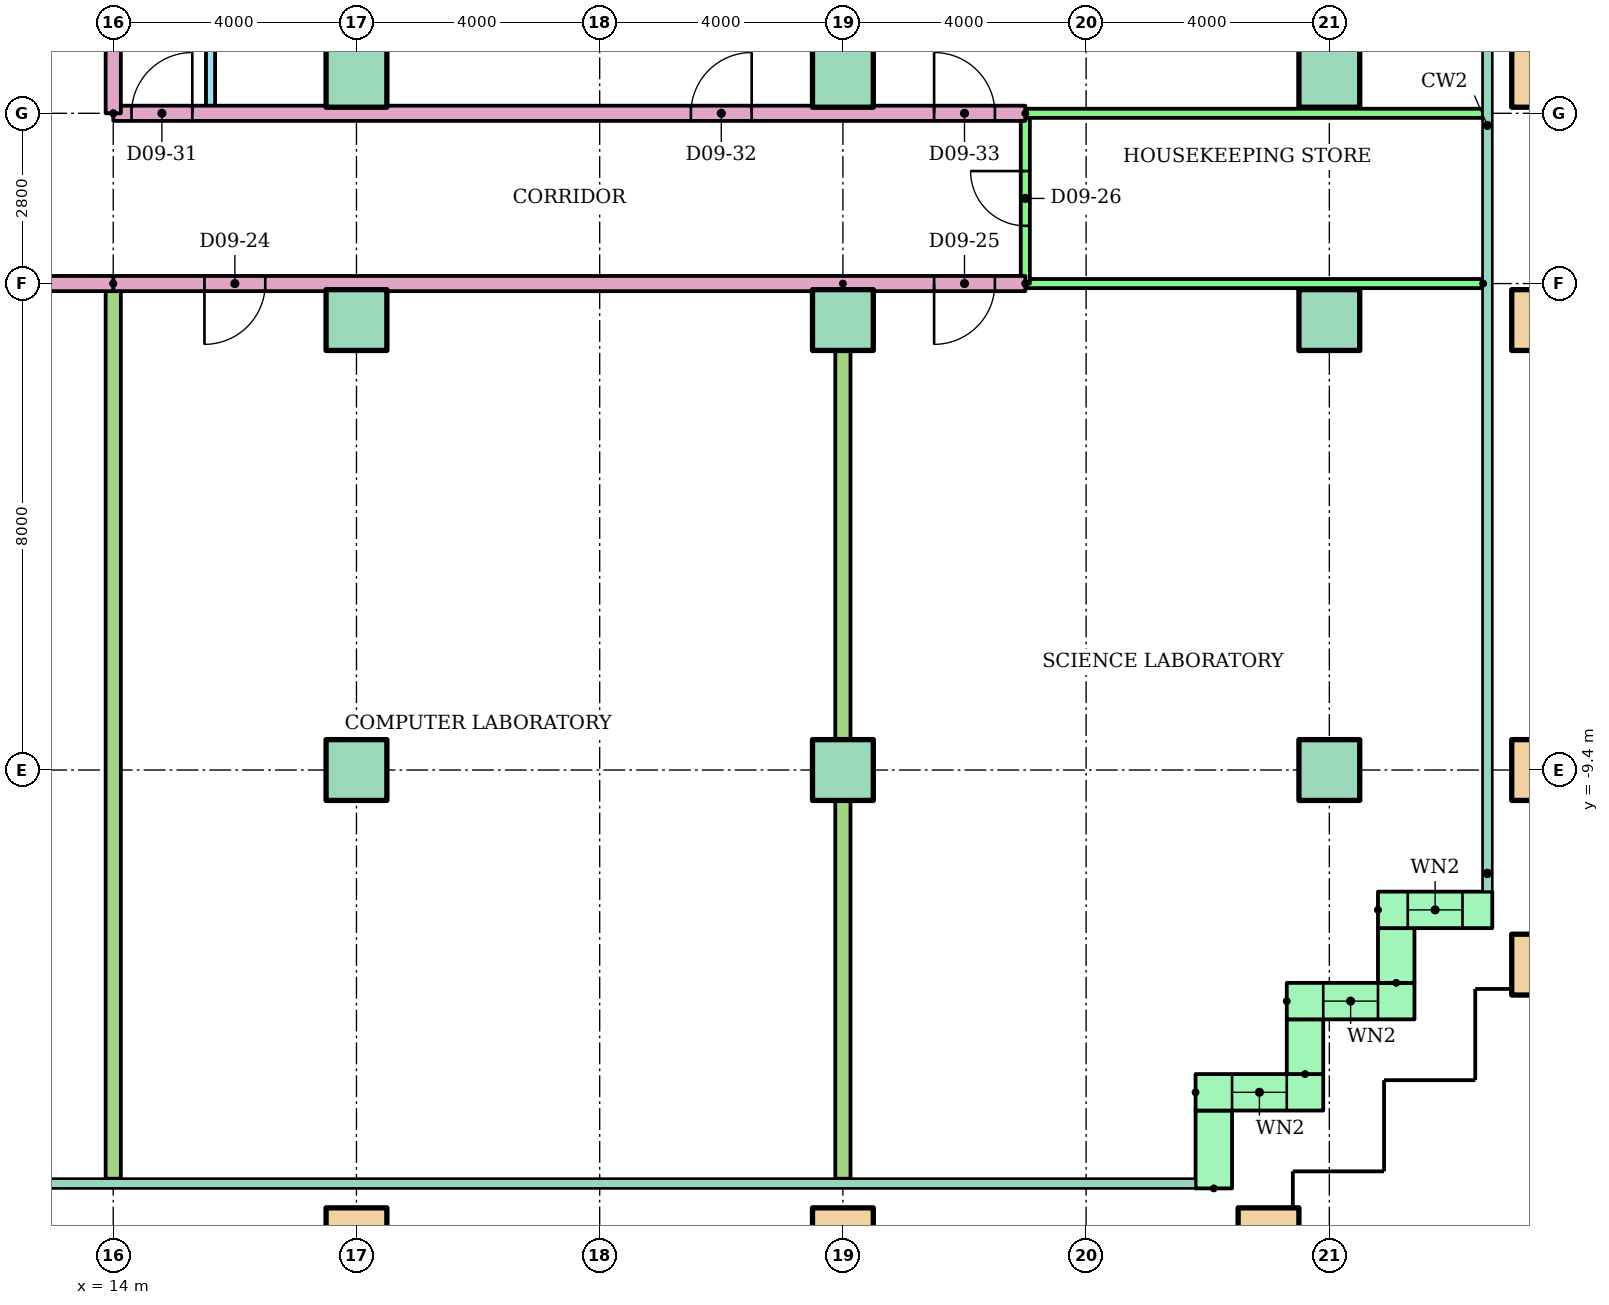
"""IFC4 building model, lengths in metres.
Left out: names, types, materials, properties, quantities, classifications, styles, units other than length and angle.
Written with IfcOpenShell. Run it as: python <this file> out.ifc"""

import sys

from ifc_helpers import new_model, si_unit, direction, frame, frame_2d, origin, origin_2d, place, context, subcontext, project, spatial, rectangle, hollow_rectangle, extrude, element, fill, save


model = new_model("IFC4")
c1 = context("Model", 3, precision=1e-05, world=origin(), true_north=direction((0.0, 1.0)))
c2 = subcontext(c1, "Body", "Model", "MODEL_VIEW")
j1 = project(units=[si_unit("LENGTHUNIT", "METRE"), si_unit("PLANEANGLEUNIT", "RADIAN")], contexts=[c1])
p1 = place(None, origin())
s1 = spatial("IfcSite", under=j1, at=p1, CompositionType="ELEMENT")
p2 = place(p1, origin())
s2 = spatial("IfcBuilding", under=s1, at=p2, CompositionType="ELEMENT")
p3 = place(p2, frame((0.0, 0.0, 37.7)))
s3 = spatial("IfcBuildingStorey", under=s2, at=p3, CompositionType="ELEMENT", Elevation=37.7)
for number, where in (
    (1, (18.0, -17.1, 0.0)),
    (2, (26.0, -17.1, 0.0)),
    (3, (33.0, -17.1, 0.0)),
    (4, (37.5, -12.6, 0.0)),
):
    element("IfcColumn", number, at=place(p3, frame(where)), inside=s3, PredefinedType="COLUMN", context=c2, shape_type="SweptSolid", body=[
        extrude(hollow_rectangle(XDim=1.0, YDim=1.0, WallThickness=0.05, at=origin_2d()), origin(), (0.0, 0.0, 1.0), 3.9),
    ])
for number, where in (
    (5, (18.0, -9.4, 0.0)),
    (6, (26.0, -9.4, 0.0)),
    (7, (34.0, -9.4, 0.0)),
):
    element("IfcColumn", number, at=place(p3, frame(where)), inside=s3, PredefinedType="COLUMN", context=c2, shape_type="SweptSolid", body=[
        extrude(rectangle(XDim=1.0, YDim=1.0, at=origin_2d()), origin(), (0.0, 0.0, 1.0), 3.9),
    ])
p4 = place(p3, frame((37.5, -9.4, 0.0)))
e8 = element("IfcColumn", 8, at=p4, inside=s3, PredefinedType="COLUMN", context=c2, shape_type="SweptSolid", body=[
    extrude(hollow_rectangle(XDim=1.0, YDim=1.0, WallThickness=0.05, at=origin_2d()), origin(), (0.0, 0.0, 1.0), 3.9),
])
for number, where in (
    (9, (18.0, -2.0, 0.0)),
    (10, (26.0, -2.0, 0.0)),
    (11, (34.0, -2.0, 0.0)),
):
    element("IfcColumn", number, at=place(p3, frame(where)), inside=s3, PredefinedType="COLUMN", context=c2, shape_type="SweptSolid", body=[
        extrude(rectangle(XDim=1.0, YDim=1.0, at=origin_2d()), origin(), (0.0, 0.0, 1.0), 3.9),
    ])
p5 = place(p3, frame((37.5, -2.0, 0.0)))
e12 = element("IfcColumn", 12, at=p5, inside=s3, PredefinedType="COLUMN", context=c2, shape_type="SweptSolid", body=[
    extrude(hollow_rectangle(XDim=1.0, YDim=1.0, WallThickness=0.05, at=origin_2d()), origin(), (0.0, 0.0, 1.0), 3.9),
])
for number, where in (
    (13, (18.0, 2.0, 0.0)),
    (14, (26.0, 2.0, 0.0)),
    (15, (34.0, 2.0, 0.0)),
):
    element("IfcColumn", number, at=place(p3, frame(where)), inside=s3, PredefinedType="COLUMN", context=c2, shape_type="SweptSolid", body=[
        extrude(rectangle(XDim=1.0, YDim=1.0, at=origin_2d()), origin(), (0.0, 0.0, 1.0), 3.9),
    ])
p6 = place(p3, frame((37.5, 2.0, 0.0)))
e16 = element("IfcColumn", 16, at=p6, inside=s3, PredefinedType="COLUMN", context=c2, shape_type="SweptSolid", body=[
    extrude(hollow_rectangle(XDim=1.0, YDim=1.0, WallThickness=0.05, at=origin_2d()), origin(), (0.0, 0.0, 1.0), 3.9),
])
p7 = place(p3, frame((32.1, -16.28, 0.0), z_axis=(0.0, 0.0, 1.0), x_axis=(0.0, 1.0, 0.0)))
e17 = element("IfcWall", 17, at=p7, inside=s3, PredefinedType="STANDARD", context=c2, shape_type="SweptSolid", body=[
    extrude(rectangle(XDim=1.28, YDim=0.6, at=frame_2d((0.64, 0.0))), origin(), (0.0, 0.0, 1.0), 3.62),
])
p8 = place(p3, frame((31.8, -14.7, 0.0)))
e18 = element("IfcWall", 18, at=p8, inside=s3, PredefinedType="STANDARD", context=c2, shape_type="SweptSolid", body=[
    extrude(rectangle(XDim=2.1, YDim=0.6, at=frame_2d((1.05, 0.0))), origin(), (0.0, 0.0, 1.0), 3.62),
])
p9 = place(p8, frame((0.6, 0.0, 0.9)))
e19 = element("IfcOpeningElement", 19, at=p9, cuts=e18, PredefinedType="OPENING", context=c2, shape_type="SweptSolid", body=[
    extrude(rectangle(XDim=0.9, YDim=1.8, at=frame_2d((0.45, 0.9))), frame((0.0, 0.31, 0.0), z_axis=(0.0, -1.0, 0.0), x_axis=(1.0, 0.0, 0.0)), (0.0, 0.0, 1.0), 0.62),
])
p10 = place(p3, frame((33.6, -14.4, 0.0), z_axis=(0.0, 0.0, 1.0), x_axis=(0.0, 1.0, 0.0)))
e20 = element("IfcWall", 20, at=p10, inside=s3, PredefinedType="STANDARD", context=c2, shape_type="SweptSolid", body=[
    extrude(rectangle(XDim=0.9, YDim=0.6, at=frame_2d((0.45, 0.0))), origin(), (0.0, 0.0, 1.0), 3.62),
])
p11 = place(p3, frame((33.3, -13.2, 0.0)))
e21 = element("IfcWall", 21, at=p11, inside=s3, PredefinedType="STANDARD", context=c2, shape_type="SweptSolid", body=[
    extrude(rectangle(XDim=2.1, YDim=0.6, at=frame_2d((1.05, 0.0))), origin(), (0.0, 0.0, 1.0), 3.62),
])
p12 = place(p11, frame((0.6, 0.0, 0.9)))
e22 = element("IfcOpeningElement", 22, at=p12, cuts=e21, PredefinedType="OPENING", context=c2, shape_type="SweptSolid", body=[
    extrude(rectangle(XDim=0.9, YDim=1.8, at=frame_2d((0.45, 0.9))), frame((0.0, 0.31, 0.0), z_axis=(0.0, -1.0, 0.0), x_axis=(1.0, 0.0, 0.0)), (0.0, 0.0, 1.0), 0.62),
])
p13 = place(p3, frame((35.1, -12.9, 0.0), z_axis=(0.0, 0.0, 1.0), x_axis=(0.0, 1.0, 0.0)))
e23 = element("IfcWall", 23, at=p13, inside=s3, PredefinedType="STANDARD", context=c2, shape_type="SweptSolid", body=[
    extrude(rectangle(XDim=0.9, YDim=0.6, at=frame_2d((0.45, 0.0))), origin(), (0.0, 0.0, 1.0), 3.62),
])
p14 = place(p3, frame((34.8, -11.7, 0.0)))
e24 = element("IfcWall", 24, at=p14, inside=s3, PredefinedType="STANDARD", context=c2, shape_type="SweptSolid", body=[
    extrude(rectangle(XDim=1.88, YDim=0.6, at=frame_2d((0.94, 0.0))), origin(), (0.0, 0.0, 1.0), 3.62),
])
p15 = place(p14, frame((0.49, 0.0, 0.9)))
e25 = element("IfcOpeningElement", 25, at=p15, cuts=e24, PredefinedType="OPENING", context=c2, shape_type="SweptSolid", body=[
    extrude(rectangle(XDim=0.9, YDim=1.8, at=frame_2d((0.45, 0.9))), frame((0.0, 0.31, 0.0), z_axis=(0.0, -1.0, 0.0), x_axis=(1.0, 0.0, 0.0)), (0.0, 0.0, 1.0), 0.62),
])
p16 = place(p3, frame((29.0, -1.4, 0.0), z_axis=(0.0, 0.0, 1.0), x_axis=(-1.0, 0.0, 0.0)))
e26 = element("IfcWall", 26, at=p16, inside=s3, PredefinedType="PARTITIONING", context=c2, shape_type="SweptSolid", body=[
    extrude(rectangle(XDim=15.0, YDim=0.25, at=frame_2d((7.5, 0.0))), origin(), (0.0, 0.0, 1.0), 3.1),
])
p17 = place(p16, frame((12.5, 0.0, 0.0)))
e27 = element("IfcOpeningElement", 27, at=p17, cuts=e26, PredefinedType="OPENING", context=c2, shape_type="SweptSolid", body=[
    extrude(rectangle(XDim=1.0, YDim=2.1, at=frame_2d((0.5, 1.05))), frame((0.0, 0.135, 0.0), z_axis=(0.0, -1.0, 0.0), x_axis=(1.0, 0.0, 0.0)), (0.0, 0.0, 1.0), 0.27),
])
p18 = place(p16, frame((0.5, 0.0, 0.0)))
e28 = element("IfcOpeningElement", 28, at=p18, cuts=e26, PredefinedType="OPENING", context=c2, shape_type="SweptSolid", body=[
    extrude(rectangle(XDim=1.0, YDim=2.1, at=frame_2d((0.5, 1.05))), frame((0.0, 0.135, 0.0), z_axis=(0.0, -1.0, 0.0), x_axis=(1.0, 0.0, 0.0)), (0.0, 0.0, 1.0), 0.27),
])
p19 = place(p3, frame((36.53, -1.4, 0.0), z_axis=(0.0, 0.0, 1.0), x_axis=(-1.0, 0.0, 0.0)))
e29 = element("IfcWall", 29, at=p19, inside=s3, PredefinedType="PARTITIONING", context=c2, shape_type="SweptSolid", body=[
    extrude(rectangle(XDim=7.53, YDim=0.15, at=frame_2d((3.765, 0.0))), origin(), (0.0, 0.0, 1.0), 3.1),
])
p20 = place(p3, frame((29.0, -1.4, 0.0), z_axis=(0.0, 0.0, 1.0), x_axis=(0.0, 1.0, 0.0)))
e30 = element("IfcWall", 30, at=p20, inside=s3, PredefinedType="PARTITIONING", context=c2, shape_type="SweptSolid", body=[
    extrude(rectangle(XDim=2.8, YDim=0.15, at=frame_2d((1.4, 0.0))), origin(), (0.0, 0.0, 1.0), 3.1),
])
p21 = place(p20, frame((0.95, 0.0, 0.0)))
e31 = element("IfcOpeningElement", 31, at=p21, cuts=e30, PredefinedType="OPENING", context=c2, shape_type="SweptSolid", body=[
    extrude(rectangle(XDim=0.9, YDim=2.1, at=frame_2d((0.45, 1.05))), frame((0.0, 0.085, 0.0), z_axis=(0.0, -1.0, 0.0), x_axis=(1.0, 0.0, 0.0)), (0.0, 0.0, 1.0), 0.17),
])
for number, where, z_axis, x_axis in (
    (32, (14.0, -1.4, 0.0), (0.0, 0.0, 1.0), (0.0, -1.0, 0.0)),
    (33, (26.0, -1.4, 0.0), (0.0, 0.0, 1.0), (0.0, -1.0, 0.0)),
):
    element("IfcWall", number, at=place(p3, frame(where, z_axis=z_axis, x_axis=x_axis)), inside=s3, PredefinedType="PARTITIONING", context=c2, shape_type="SweptSolid", body=[
        extrude(rectangle(XDim=14.721, YDim=0.25, at=frame_2d((7.361, 0.0))), origin(), (0.0, 0.0, 1.0), 3.1),
    ])
p22 = place(p3, frame((14.0, 1.4, 0.0)))
e34 = element("IfcWall", 34, at=p22, inside=s3, PredefinedType="PARTITIONING", context=c2, shape_type="SweptSolid", body=[
    extrude(rectangle(XDim=15.0, YDim=0.25, at=frame_2d((7.5, 0.0))), origin(), (0.0, 0.0, 1.0), 3.1),
])
p23 = place(p22, frame((0.3, 0.0, 0.0)))
e35 = element("IfcOpeningElement", 35, at=p23, cuts=e34, PredefinedType="OPENING", context=c2, shape_type="SweptSolid", body=[
    extrude(rectangle(XDim=1.0, YDim=2.1, at=frame_2d((0.5, 1.05))), frame((0.0, 0.135, 0.0), z_axis=(0.0, -1.0, 0.0), x_axis=(1.0, 0.0, 0.0)), (0.0, 0.0, 1.0), 0.27),
])
p24 = place(p22, frame((9.5, 0.0, 0.0)))
e36 = element("IfcOpeningElement", 36, at=p24, cuts=e34, PredefinedType="OPENING", context=c2, shape_type="SweptSolid", body=[
    extrude(rectangle(XDim=1.0, YDim=2.1, at=frame_2d((0.5, 1.05))), frame((0.0, 0.135, 0.0), z_axis=(0.0, -1.0, 0.0), x_axis=(1.0, 0.0, 0.0)), (0.0, 0.0, 1.0), 0.27),
])
p25 = place(p22, frame((13.5, 0.0, 0.0)))
e37 = element("IfcOpeningElement", 37, at=p25, cuts=e34, PredefinedType="OPENING", context=c2, shape_type="SweptSolid", body=[
    extrude(rectangle(XDim=1.0, YDim=2.1, at=frame_2d((0.5, 1.05))), frame((0.0, 0.135, 0.0), z_axis=(0.0, -1.0, 0.0), x_axis=(1.0, 0.0, 0.0)), (0.0, 0.0, 1.0), 0.27),
])
p26 = place(p3, frame((29.0, 1.4, 0.0)))
e38 = element("IfcWall", 38, at=p26, inside=s3, PredefinedType="PARTITIONING", context=c2, shape_type="SweptSolid", body=[
    extrude(rectangle(XDim=7.53, YDim=0.15, at=frame_2d((3.765, 0.0))), origin(), (0.0, 0.0, 1.0), 3.1),
])
p27 = place(p3, frame((15.6, 18.521, 0.0), z_axis=(0.0, 0.0, 1.0), x_axis=(0.0, -1.0, 0.0)))
e39 = element("IfcWall", 39, at=p27, inside=s3, PredefinedType="PARTITIONING", context=c2, shape_type="SweptSolid", body=[
    extrude(rectangle(XDim=17.121, YDim=0.15, at=frame_2d((8.561, 0.0))), origin(), (0.0, 0.0, 1.0), 3.1),
])
p28 = place(p27, frame((15.071, 0.0, 0.0)))
e40 = element("IfcOpeningElement", 40, at=p28, cuts=e39, PredefinedType="OPENING", context=c2, shape_type="SweptSolid", body=[
    extrude(rectangle(XDim=0.9, YDim=2.1, at=frame_2d((0.45, 1.05))), frame((0.0, 0.085, 0.0), z_axis=(0.0, -1.0, 0.0), x_axis=(1.0, 0.0, 0.0)), (0.0, 0.0, 1.0), 0.17),
])
p29 = place(p27, frame((10.071, 0.0, 0.0)))
e41 = element("IfcOpeningElement", 41, at=p29, cuts=e39, PredefinedType="OPENING", context=c2, shape_type="SweptSolid", body=[
    extrude(rectangle(XDim=0.9, YDim=2.1, at=frame_2d((0.45, 1.05))), frame((0.0, 0.085, 0.0), z_axis=(0.0, -1.0, 0.0), x_axis=(1.0, 0.0, 0.0)), (0.0, 0.0, 1.0), 0.17),
])
p30 = place(p27, frame((5.021, 0.0, 0.0)))
e42 = element("IfcOpeningElement", 42, at=p30, cuts=e39, PredefinedType="OPENING", context=c2, shape_type="SweptSolid", body=[
    extrude(rectangle(XDim=1.0, YDim=2.1, at=frame_2d((0.5, 1.05))), frame((0.0, 0.085, 0.0), z_axis=(0.0, -1.0, 0.0), x_axis=(1.0, 0.0, 0.0)), (0.0, 0.0, 1.0), 0.17),
])
p31 = place(p27, frame((1.471, 0.0, 0.0)))
e43 = element("IfcOpeningElement", 43, at=p31, cuts=e39, PredefinedType="OPENING", context=c2, shape_type="SweptSolid", body=[
    extrude(rectangle(XDim=0.9, YDim=2.1, at=frame_2d((0.45, 1.05))), frame((0.0, 0.085, 0.0), z_axis=(0.0, -1.0, 0.0), x_axis=(1.0, 0.0, 0.0)), (0.0, 0.0, 1.0), 0.17),
])
for number, where, z_axis, x_axis in (
    (44, (18.0, 18.521, 0.0), (0.0, 0.0, 1.0), (0.0, -1.0, 0.0)),
    (45, (26.0, 18.521, 0.0), (0.0, 0.0, 1.0), (0.0, -1.0, 0.0)),
):
    element("IfcWall", number, at=place(p3, frame(where, z_axis=z_axis, x_axis=x_axis)), inside=s3, PredefinedType="PARTITIONING", context=c2, shape_type="SweptSolid", body=[
        extrude(rectangle(XDim=17.121, YDim=0.25, at=frame_2d((8.561, 0.0))), origin(), (0.0, 0.0, 1.0), 3.1),
    ])
p32 = place(p3, frame((14.0, -1.4, 0.0), z_axis=(0.0, 0.0, 1.0), x_axis=(-1.0, 0.0, 0.0)))
e46 = element("IfcWall", 46, at=p32, inside=s3, PredefinedType="PARTITIONING", context=c2, shape_type="SweptSolid", body=[
    extrude(rectangle(XDim=28.0, YDim=0.25, at=frame_2d((14.0, 0.0))), origin(), (0.0, 0.0, 1.0), 3.1),
])
p33 = place(p32, frame((21.5, 0.0, 0.0)))
e47 = element("IfcOpeningElement", 47, at=p33, cuts=e46, PredefinedType="OPENING", context=c2, shape_type="SweptSolid", body=[
    extrude(rectangle(XDim=1.0, YDim=2.1, at=frame_2d((0.5, 1.05))), frame((0.0, 0.135, 0.0), z_axis=(0.0, -1.0, 0.0), x_axis=(1.0, 0.0, 0.0)), (0.0, 0.0, 1.0), 0.27),
])
p34 = place(p32, frame((17.5, 0.0, 0.0)))
e48 = element("IfcOpeningElement", 48, at=p34, cuts=e46, PredefinedType="OPENING", context=c2, shape_type="SweptSolid", body=[
    extrude(rectangle(XDim=1.0, YDim=2.1, at=frame_2d((0.5, 1.05))), frame((0.0, 0.135, 0.0), z_axis=(0.0, -1.0, 0.0), x_axis=(1.0, 0.0, 0.0)), (0.0, 0.0, 1.0), 0.27),
])
p35 = place(p32, frame((1.5, 0.0, 0.0)))
e49 = element("IfcOpeningElement", 49, at=p35, cuts=e46, PredefinedType="OPENING", context=c2, shape_type="SweptSolid", body=[
    extrude(rectangle(XDim=1.0, YDim=2.1, at=frame_2d((0.5, 1.05))), frame((0.0, 0.135, 0.0), z_axis=(0.0, -1.0, 0.0), x_axis=(1.0, 0.0, 0.0)), (0.0, 0.0, 1.0), 0.27),
])
p36 = place(p3, frame((14.0, 1.4, 0.0), z_axis=(0.0, 0.0, 1.0), x_axis=(0.0, 1.0, 0.0)))
e50 = element("IfcWall", 50, at=p36, inside=s3, PredefinedType="PARTITIONING", context=c2, shape_type="SweptSolid", body=[
    extrude(rectangle(XDim=1.6, YDim=0.25, at=frame_2d((0.8, 0.0))), origin(), (0.0, 0.0, 1.0), 3.1),
])
p37 = place(p9, origin())
e51 = element("IfcWindow", 51, at=p37, inside=s3, PartitioningType="SINGLE_PANEL", PredefinedType="WINDOW", context=c2, shape_type="SweptSolid", body=[
    extrude(rectangle(XDim=0.9, YDim=1.8, at=frame_2d((0.45, 0.9))), frame((0.0, 0.03, 0.0), z_axis=(0.0, -1.0, 0.0), x_axis=(1.0, 0.0, 0.0)), (0.0, 0.0, 1.0), 0.06),
])
fill(e19, e51)
p38 = place(p12, origin())
e52 = element("IfcWindow", 52, at=p38, inside=s3, PartitioningType="SINGLE_PANEL", PredefinedType="WINDOW", context=c2, shape_type="SweptSolid", body=[
    extrude(rectangle(XDim=0.9, YDim=1.8, at=frame_2d((0.45, 0.9))), frame((0.0, 0.03, 0.0), z_axis=(0.0, -1.0, 0.0), x_axis=(1.0, 0.0, 0.0)), (0.0, 0.0, 1.0), 0.06),
])
fill(e22, e52)
p39 = place(p15, origin())
e53 = element("IfcWindow", 53, at=p39, inside=s3, PartitioningType="SINGLE_PANEL", PredefinedType="WINDOW", context=c2, shape_type="SweptSolid", body=[
    extrude(rectangle(XDim=0.9, YDim=1.8, at=frame_2d((0.45, 0.9))), frame((0.0, 0.03, 0.0), z_axis=(0.0, -1.0, 0.0), x_axis=(1.0, 0.0, 0.0)), (0.0, 0.0, 1.0), 0.06),
])
fill(e25, e53)
p40 = place(p17, origin())
e54 = element("IfcDoor", 54, at=p40, inside=s3, OperationType="SINGLE_SWING_RIGHT", PredefinedType="DOOR", context=c2, shape_type="SweptSolid", body=[
    extrude(rectangle(XDim=1.0, YDim=2.1, at=frame_2d((0.5, 1.05))), frame((0.0, 0.025, 0.0), z_axis=(0.0, -1.0, 0.0), x_axis=(1.0, 0.0, 0.0)), (0.0, 0.0, 1.0), 0.05),
])
fill(e27, e54)
p41 = place(p18, origin())
e55 = element("IfcDoor", 55, at=p41, inside=s3, OperationType="SINGLE_SWING_RIGHT", PredefinedType="DOOR", context=c2, shape_type="SweptSolid", body=[
    extrude(rectangle(XDim=1.0, YDim=2.1, at=frame_2d((0.5, 1.05))), frame((0.0, 0.025, 0.0), z_axis=(0.0, -1.0, 0.0), x_axis=(1.0, 0.0, 0.0)), (0.0, 0.0, 1.0), 0.05),
])
fill(e28, e55)
p42 = place(p21, origin())
e56 = element("IfcDoor", 56, at=p42, inside=s3, OperationType="SINGLE_SWING_RIGHT", PredefinedType="DOOR", context=c2, shape_type="SweptSolid", body=[
    extrude(rectangle(XDim=0.9, YDim=2.1, at=frame_2d((0.45, 1.05))), frame((0.0, 0.025, 0.0), z_axis=(0.0, -1.0, 0.0), x_axis=(1.0, 0.0, 0.0)), (0.0, 0.0, 1.0), 0.05),
])
fill(e31, e56)
p43 = place(p23, origin())
e57 = element("IfcDoor", 57, at=p43, inside=s3, OperationType="SINGLE_SWING_RIGHT", PredefinedType="DOOR", context=c2, shape_type="SweptSolid", body=[
    extrude(rectangle(XDim=1.0, YDim=2.1, at=frame_2d((0.5, 1.05))), frame((0.0, 0.025, 0.0), z_axis=(0.0, -1.0, 0.0), x_axis=(1.0, 0.0, 0.0)), (0.0, 0.0, 1.0), 0.05),
])
fill(e35, e57)
p44 = place(p24, origin())
e58 = element("IfcDoor", 58, at=p44, inside=s3, OperationType="SINGLE_SWING_RIGHT", PredefinedType="DOOR", context=c2, shape_type="SweptSolid", body=[
    extrude(rectangle(XDim=1.0, YDim=2.1, at=frame_2d((0.5, 1.05))), frame((0.0, 0.025, 0.0), z_axis=(0.0, -1.0, 0.0), x_axis=(1.0, 0.0, 0.0)), (0.0, 0.0, 1.0), 0.05),
])
fill(e36, e58)
p45 = place(p25, origin())
e59 = element("IfcDoor", 59, at=p45, inside=s3, OperationType="SINGLE_SWING_LEFT", PredefinedType="DOOR", context=c2, shape_type="SweptSolid", body=[
    extrude(rectangle(XDim=1.0, YDim=2.1, at=frame_2d((0.5, 1.05))), frame((0.0, 0.025, 0.0), z_axis=(0.0, -1.0, 0.0), x_axis=(1.0, 0.0, 0.0)), (0.0, 0.0, 1.0), 0.05),
])
fill(e37, e59)
save(model, sys.argv[1])
